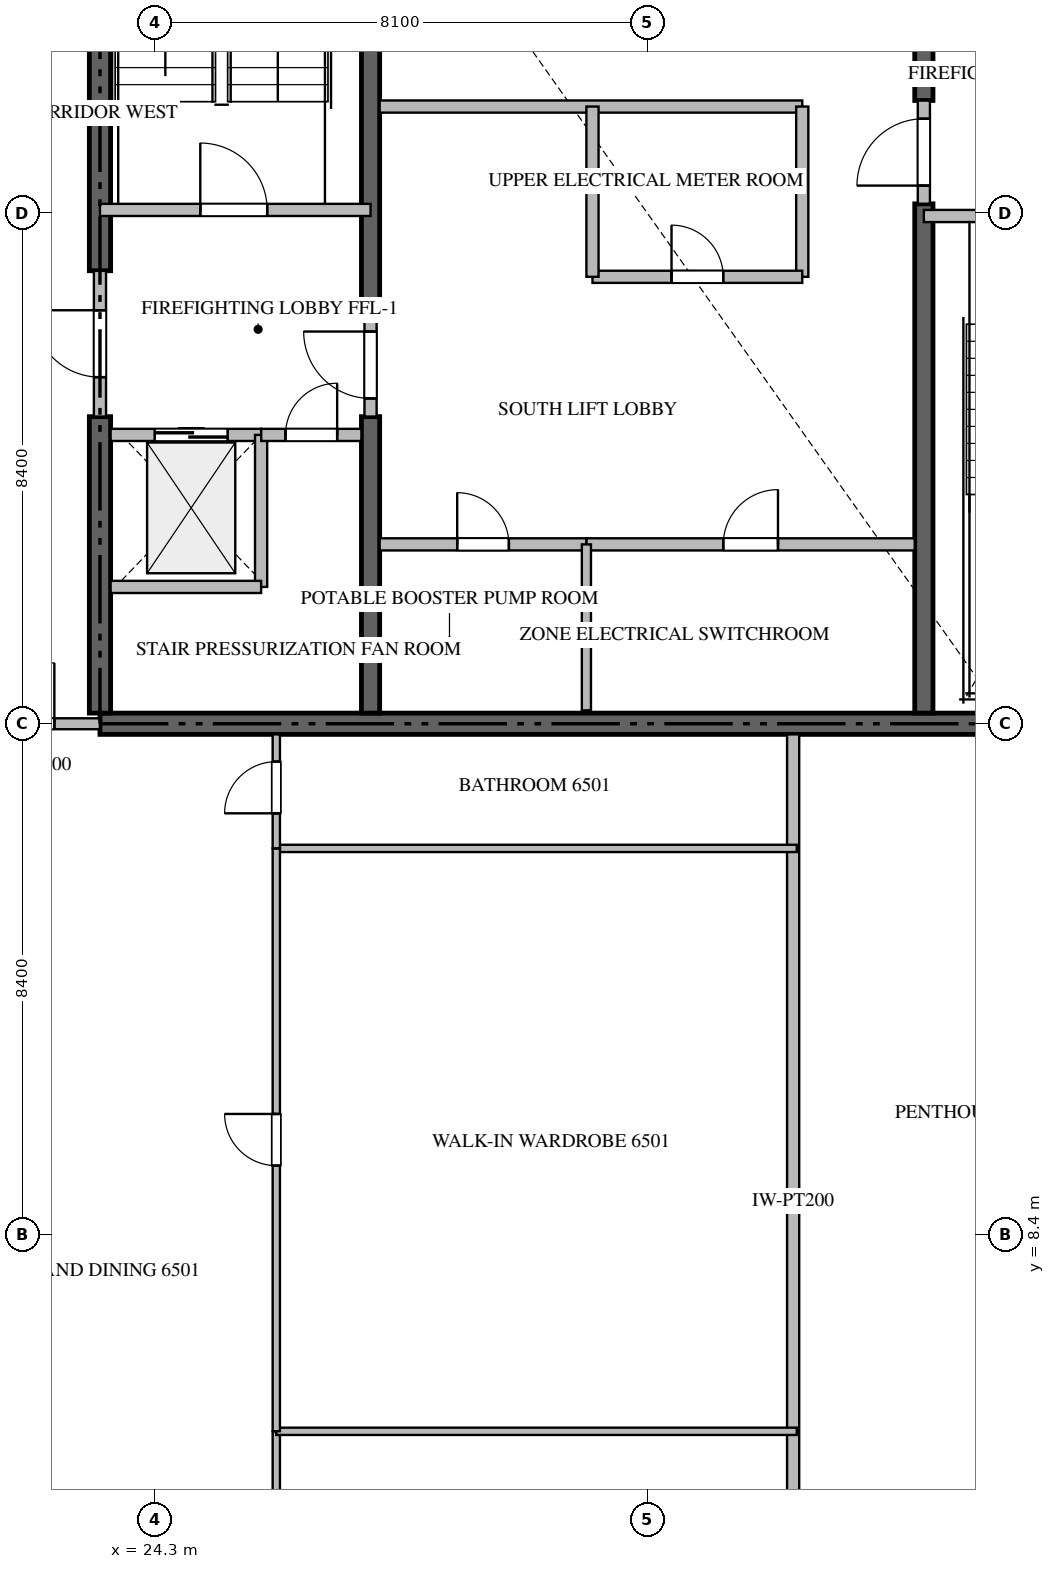
"""IFC4 building model, lengths in metres.
Left out: names, types, materials, properties, quantities, classifications, styles, units other than length and angle.
Written with IfcOpenShell. Run it as: python <this file> out.ifc"""

import sys

from ifc_helpers import new_model, si_unit, direction, frame, frame_2d, origin, place, context, subcontext, project, spatial, rectangle, extrude, source, transform, mapped, element, fill, save


model = new_model("IFC4")
c1 = context("Model", 3, precision=1e-05, world=origin(), true_north=direction((0.0, 1.0)))
c2 = subcontext(c1, "Body", "Model", "MODEL_VIEW")
j1 = project(units=[si_unit("LENGTHUNIT", "METRE"), si_unit("PLANEANGLEUNIT", "RADIAN")], contexts=[c1])
p1 = place(None, origin())
s1 = spatial("IfcSite", under=j1, at=p1, CompositionType="ELEMENT")
p2 = place(p1, origin())
s2 = spatial("IfcBuilding", under=s1, at=p2, CompositionType="ELEMENT")
p3 = place(p2, frame((0.0, 0.0, 260.5)))
s3 = spatial("IfcBuildingStorey", under=s2, at=p3, CompositionType="ELEMENT", Elevation=260.5)
p4 = place(p3, frame((23.4, 16.8, -0.26), z_axis=(0.0, 0.0, 1.0), x_axis=(1.0, 0.0, 0.0)))
e1 = element("IfcWall", 1, at=p4, inside=s3, PredefinedType="SHEAR", context=c2, shape_type="SweptSolid", body=[
    extrude(rectangle(XDim=18.0, YDim=0.35, at=frame_2d((9.0, 0.0))), origin(), (0.0, 0.0, 1.0), 3.848),
])
p5 = place(p3, frame((23.4, 16.975, -0.26), z_axis=(0.0, 0.0, 1.0), x_axis=(0.0, 1.0, 0.0)))
e2 = element("IfcWall", 2, at=p5, inside=s3, PredefinedType="SHEAR", context=c2, shape_type="SweptSolid", body=[
    extrude(rectangle(XDim=4.875, YDim=0.35, at=frame_2d((2.438, 0.0))), origin(), (0.0, 0.0, 1.0), 3.848),
])
p6 = place(p3, frame((23.4, 24.25, -0.26), z_axis=(0.0, 0.0, 1.0), x_axis=(0.0, 1.0, 0.0)))
e3 = element("IfcWall", 3, at=p6, inside=s3, PredefinedType="SHEAR", context=c2, shape_type="SweptSolid", body=[
    extrude(rectangle(XDim=9.175, YDim=0.35, at=frame_2d((4.587, 0.0))), origin(), (0.0, 0.0, 1.0), 3.848),
])
p7 = place(p3, frame((27.85, 16.975, -0.26), z_axis=(0.0, 0.0, 1.0), x_axis=(0.0, 1.0, 0.0)))
e4 = element("IfcWall", 4, at=p7, inside=s3, PredefinedType="SHEAR", context=c2, shape_type="SweptSolid", body=[
    extrude(rectangle(XDim=4.875, YDim=0.3, at=frame_2d((2.438, 0.0))), origin(), (0.0, 0.0, 1.0), 3.848),
])
p8 = place(p3, frame((27.85, 23.55, -0.26), z_axis=(0.0, 0.0, 1.0), x_axis=(0.0, 1.0, 0.0)))
e5 = element("IfcWall", 5, at=p8, inside=s3, PredefinedType="SHEAR", context=c2, shape_type="SweptSolid", body=[
    extrude(rectangle(XDim=9.875, YDim=0.3, at=frame_2d((4.938, 0.0))), origin(), (0.0, 0.0, 1.0), 3.848),
])
p9 = place(p3, frame((36.95, 16.975, -0.26), z_axis=(0.0, 0.0, 1.0), x_axis=(0.0, 1.0, 0.0)))
e6 = element("IfcWall", 6, at=p9, inside=s3, PredefinedType="SHEAR", context=c2, shape_type="SweptSolid", body=[
    extrude(rectangle(XDim=8.375, YDim=0.3, at=frame_2d((4.188, 0.0))), origin(), (0.0, 0.0, 1.0), 3.848),
])
p10 = place(p3, frame((36.95, 27.05, -0.26), z_axis=(0.0, 0.0, 1.0), x_axis=(0.0, 1.0, 0.0)))
e7 = element("IfcWall", 7, at=p10, inside=s3, PredefinedType="SHEAR", context=c2, shape_type="SweptSolid", body=[
    extrude(rectangle(XDim=6.375, YDim=0.3, at=frame_2d((3.188, 0.0))), origin(), (0.0, 0.0, 1.0), 3.848),
])
p11 = place(p3, frame((23.4, 25.25, 0.0), z_axis=(0.0, 0.0, 1.0), x_axis=(1.0, 0.0, 0.0)))
e8 = element("IfcWall", 8, at=p11, inside=s3, PredefinedType="STANDARD", context=c2, shape_type="SweptSolid", body=[
    extrude(rectangle(XDim=4.45, YDim=0.2, at=frame_2d((2.225, 0.0))), origin(), (0.0, 0.0, 1.0), 3.59),
])
p12 = place(p11, frame((1.65, 0.0, 0.0)))
e9 = element("IfcOpeningElement", 9, at=p12, cuts=e8, PredefinedType="OPENING", context=c2, shape_type="SweptSolid", body=[
    extrude(rectangle(XDim=1.1, YDim=2.15, at=frame_2d((0.55, 1.075))), frame((0.0, 0.11, 0.0), z_axis=(0.0, -1.0, 0.0), x_axis=(1.0, 0.0, 0.0)), (0.0, 0.0, 1.0), 0.22),
])
p13 = place(p3, frame((36.95, 25.15, 0.0), z_axis=(0.0, 0.0, 1.0), x_axis=(1.0, 0.0, 0.0)))
e10 = element("IfcWall", 10, at=p13, inside=s3, PredefinedType="STANDARD", context=c2, shape_type="SweptSolid", body=[
    extrude(rectangle(XDim=4.45, YDim=0.2, at=frame_2d((2.225, 0.0))), origin(), (0.0, 0.0, 1.0), 3.59),
])
p14 = place(p13, frame((1.65, 0.0, 0.0)))
e11 = element("IfcOpeningElement", 11, at=p14, cuts=e10, PredefinedType="OPENING", context=c2, shape_type="SweptSolid", body=[
    extrude(rectangle(XDim=1.1, YDim=2.15, at=frame_2d((0.55, 1.075))), frame((0.0, 0.11, 0.0), z_axis=(0.0, -1.0, 0.0), x_axis=(1.0, 0.0, 0.0)), (0.0, 0.0, 1.0), 0.22),
])
p15 = place(p3, frame((23.575, 21.55, 0.0), z_axis=(0.0, 0.0, 1.0), x_axis=(1.0, 0.0, 0.0)))
e12 = element("IfcWall", 12, at=p15, inside=s3, PredefinedType="STANDARD", context=c2, shape_type="SweptSolid", body=[
    extrude(rectangle(XDim=2.475, YDim=0.2, at=frame_2d((1.238, 0.0))), origin(), (0.0, 0.0, 1.0), 3.59),
])
p16 = place(p15, frame((0.725, 0.0, 0.0)))
e13 = element("IfcOpeningElement", 13, at=p16, cuts=e12, PredefinedType="OPENING", context=c2, shape_type="SweptSolid", body=[
    extrude(rectangle(XDim=1.2, YDim=2.2, at=frame_2d((0.6, 1.1))), frame((0.0, 0.11, 0.0), z_axis=(0.0, -1.0, 0.0), x_axis=(1.0, 0.0, 0.0)), (0.0, 0.0, 1.0), 0.22),
])
p17 = place(p3, frame((26.05, 19.05, 0.0), z_axis=(0.0, 0.0, 1.0), x_axis=(0.0, 1.0, 0.0)))
e14 = element("IfcWall", 14, at=p17, inside=s3, PredefinedType="STANDARD", context=c2, shape_type="SweptSolid", body=[
    extrude(rectangle(XDim=2.5, YDim=0.2, at=frame_2d((1.25, 0.0))), origin(), (0.0, 0.0, 1.0), 3.59),
])
p18 = place(p3, frame((23.575, 19.05, 0.0), z_axis=(0.0, 0.0, 1.0), x_axis=(1.0, 0.0, 0.0)))
e15 = element("IfcWall", 15, at=p18, inside=s3, PredefinedType="STANDARD", context=c2, shape_type="SweptSolid", body=[
    extrude(rectangle(XDim=2.475, YDim=0.2, at=frame_2d((1.238, 0.0))), origin(), (0.0, 0.0, 1.0), 3.59),
])
p19 = place(p3, frame((26.052, 21.55, 0.0), z_axis=(0.0, 0.0, 1.0), x_axis=(1.0, 0.0, 0.0)))
e16 = element("IfcWall", 16, at=p19, inside=s3, PredefinedType="STANDARD", context=c2, shape_type="SweptSolid", body=[
    extrude(rectangle(XDim=1.648, YDim=0.2, at=frame_2d((0.824, 0.0))), origin(), (0.0, 0.0, 1.0), 3.59),
])
p20 = place(p19, frame((0.399, 0.0, 0.0)))
e17 = element("IfcOpeningElement", 17, at=p20, cuts=e16, PredefinedType="OPENING", context=c2, shape_type="SweptSolid", body=[
    extrude(rectangle(XDim=0.85, YDim=2.1, at=frame_2d((0.425, 1.05))), frame((0.0, 0.11, 0.0), z_axis=(0.0, -1.0, 0.0), x_axis=(1.0, 0.0, 0.0)), (0.0, 0.0, 1.0), 0.22),
])
p21 = place(p3, frame((23.4, 21.852, 0.0), z_axis=(0.0, 0.0, 1.0), x_axis=(0.0, 1.0, 0.0)))
e18 = element("IfcWall", 18, at=p21, inside=s3, PredefinedType="STANDARD", context=c2, shape_type="SweptSolid", body=[
    extrude(rectangle(XDim=2.396, YDim=0.2, at=frame_2d((1.198, 0.0))), origin(), (0.0, 0.0, 1.0), 3.59),
])
p22 = place(p21, frame((0.648, 0.0, 0.0)))
e19 = element("IfcOpeningElement", 19, at=p22, cuts=e18, PredefinedType="OPENING", context=c2, shape_type="SweptSolid", body=[
    extrude(rectangle(XDim=1.1, YDim=2.15, at=frame_2d((0.55, 1.075))), frame((0.0, 0.11, 0.0), z_axis=(0.0, -1.0, 0.0), x_axis=(1.0, 0.0, 0.0)), (0.0, 0.0, 1.0), 0.22),
])
p23 = place(p3, frame((27.85, 21.852, 0.0), z_axis=(0.0, 0.0, 1.0), x_axis=(0.0, 1.0, 0.0)))
e20 = element("IfcWall", 20, at=p23, inside=s3, PredefinedType="STANDARD", context=c2, shape_type="SweptSolid", body=[
    extrude(rectangle(XDim=1.696, YDim=0.2, at=frame_2d((0.848, 0.0))), origin(), (0.0, 0.0, 1.0), 3.59),
])
p24 = place(p23, frame((0.298, 0.0, 0.0)))
e21 = element("IfcOpeningElement", 21, at=p24, cuts=e20, PredefinedType="OPENING", context=c2, shape_type="SweptSolid", body=[
    extrude(rectangle(XDim=1.1, YDim=2.15, at=frame_2d((0.55, 1.075))), frame((0.0, 0.11, 0.0), z_axis=(0.0, -1.0, 0.0), x_axis=(1.0, 0.0, 0.0)), (0.0, 0.0, 1.0), 0.22),
])
p25 = place(p3, frame((36.95, 25.352, 0.0), z_axis=(0.0, 0.0, 1.0), x_axis=(0.0, 1.0, 0.0)))
e22 = element("IfcWall", 22, at=p25, inside=s3, PredefinedType="STANDARD", context=c2, shape_type="SweptSolid", body=[
    extrude(rectangle(XDim=1.696, YDim=0.2, at=frame_2d((0.848, 0.0))), origin(), (0.0, 0.0, 1.0), 3.59),
])
p26 = place(p25, frame((0.298, 0.0, 0.0)))
e23 = element("IfcOpeningElement", 23, at=p26, cuts=e22, PredefinedType="OPENING", context=c2, shape_type="SweptSolid", body=[
    extrude(rectangle(XDim=1.1, YDim=2.15, at=frame_2d((0.55, 1.075))), frame((0.0, 0.11, 0.0), z_axis=(0.0, -1.0, 0.0), x_axis=(1.0, 0.0, 0.0)), (0.0, 0.0, 1.0), 0.22),
])
p27 = place(p3, frame((28.0, 19.75, 0.0), z_axis=(0.0, 0.0, 1.0), x_axis=(1.0, 0.0, 0.0)))
e24 = element("IfcWall", 24, at=p27, inside=s3, PredefinedType="STANDARD", context=c2, shape_type="SweptSolid", body=[
    extrude(rectangle(XDim=3.4, YDim=0.2, at=frame_2d((1.7, 0.0))), origin(), (0.0, 0.0, 1.0), 3.59),
])
p28 = place(p27, frame((1.275, 0.0, 0.0)))
e25 = element("IfcOpeningElement", 25, at=p28, cuts=e24, PredefinedType="OPENING", context=c2, shape_type="SweptSolid", body=[
    extrude(rectangle(XDim=0.85, YDim=2.1, at=frame_2d((0.425, 1.05))), frame((0.0, 0.11, 0.0), z_axis=(0.0, -1.0, 0.0), x_axis=(1.0, 0.0, 0.0)), (0.0, 0.0, 1.0), 0.22),
])
p29 = place(p3, frame((31.402, 19.75, 0.0), z_axis=(0.0, 0.0, 1.0), x_axis=(1.0, 0.0, 0.0)))
e26 = element("IfcWall", 26, at=p29, inside=s3, PredefinedType="STANDARD", context=c2, shape_type="SweptSolid", body=[
    extrude(rectangle(XDim=5.398, YDim=0.2, at=frame_2d((2.699, 0.0))), origin(), (0.0, 0.0, 1.0), 3.59),
])
p30 = place(p29, frame((2.249, 0.0, 0.0)))
e27 = element("IfcOpeningElement", 27, at=p30, cuts=e26, PredefinedType="OPENING", context=c2, shape_type="SweptSolid", body=[
    extrude(rectangle(XDim=0.9, YDim=2.1, at=frame_2d((0.45, 1.05))), frame((0.0, 0.11, 0.0), z_axis=(0.0, -1.0, 0.0), x_axis=(1.0, 0.0, 0.0)), (0.0, 0.0, 1.0), 0.22),
])
p31 = place(p3, frame((31.4, 17.02, 0.0), z_axis=(0.0, 0.0, 1.0), x_axis=(0.0, 1.0, 0.0)))
e28 = element("IfcWall", 28, at=p31, inside=s3, PredefinedType="PARTITIONING", context=c2, shape_type="SweptSolid", body=[
    extrude(rectangle(XDim=2.73, YDim=0.15, at=frame_2d((1.365, 0.0))), origin(), (0.0, 0.0, 1.0), 3.59),
])
p32 = place(p3, frame((28.0, 26.95, 0.0), z_axis=(0.0, 0.0, 1.0), x_axis=(1.0, 0.0, 0.0)))
e29 = element("IfcWall", 29, at=p32, inside=s3, PredefinedType="STANDARD", context=c2, shape_type="SweptSolid", body=[
    extrude(rectangle(XDim=6.95, YDim=0.2, at=frame_2d((3.475, 0.0))), origin(), (0.0, 0.0, 1.0), 3.59),
])
p33 = place(p3, frame((34.95, 24.15, 0.0), z_axis=(0.0, 0.0, 1.0), x_axis=(0.0, 1.0, 0.0)))
e30 = element("IfcWall", 30, at=p33, inside=s3, PredefinedType="STANDARD", context=c2, shape_type="SweptSolid", body=[
    extrude(rectangle(XDim=2.8, YDim=0.2, at=frame_2d((1.4, 0.0))), origin(), (0.0, 0.0, 1.0), 3.59),
])
p34 = place(p3, frame((31.5, 24.15, 0.0), z_axis=(0.0, 0.0, 1.0), x_axis=(1.0, 0.0, 0.0)))
e31 = element("IfcWall", 31, at=p34, inside=s3, PredefinedType="STANDARD", context=c2, shape_type="SweptSolid", body=[
    extrude(rectangle(XDim=3.45, YDim=0.2, at=frame_2d((1.725, 0.0))), origin(), (0.0, 0.0, 1.0), 3.59),
])
p35 = place(p34, frame((1.3, 0.0, 0.0)))
e32 = element("IfcOpeningElement", 32, at=p35, cuts=e31, PredefinedType="OPENING", context=c2, shape_type="SweptSolid", body=[
    extrude(rectangle(XDim=0.85, YDim=2.1, at=frame_2d((0.425, 1.05))), frame((0.0, 0.11, 0.0), z_axis=(0.0, -1.0, 0.0), x_axis=(1.0, 0.0, 0.0)), (0.0, 0.0, 1.0), 0.22),
])
p36 = place(p3, frame((31.5, 24.15, 0.0), z_axis=(0.0, 0.0, 1.0), x_axis=(0.0, 1.0, 0.0)))
e33 = element("IfcWall", 33, at=p36, inside=s3, PredefinedType="STANDARD", context=c2, shape_type="SweptSolid", body=[
    extrude(rectangle(XDim=2.8, YDim=0.2, at=frame_2d((1.4, 0.0))), origin(), (0.0, 0.0, 1.0), 3.59),
])
p37 = place(p3, frame((34.8, 1.282, 0.0), z_axis=(0.0, 0.0, 1.0), x_axis=(0.0, 1.0, 0.0)))
e34 = element("IfcWall", 34, at=p37, inside=s3, PredefinedType="PARTITIONING", context=c2, shape_type="SweptSolid", body=[
    extrude(rectangle(XDim=15.343, YDim=0.2, at=frame_2d((7.671, 0.0))), origin(), (0.0, 0.0, 1.0), 3.59),
])
p38 = place(p3, frame((20.902, 16.8, 0.0), z_axis=(0.0, 0.0, 1.0), x_axis=(1.0, 0.0, 0.0)))
e35 = element("IfcWall", 35, at=p38, inside=s3, PredefinedType="PARTITIONING", context=c2, shape_type="SweptSolid", body=[
    extrude(rectangle(XDim=2.496, YDim=0.18, at=frame_2d((1.248, 0.0))), origin(), (0.0, 0.0, 1.0), 3.59),
])
p39 = place(p38, frame((0.748, 0.0, 0.0)))
e36 = element("IfcOpeningElement", 36, at=p39, cuts=e35, PredefinedType="OPENING", context=c2, shape_type="SweptSolid", body=[
    extrude(rectangle(XDim=1.0, YDim=2.15, at=frame_2d((0.5, 1.075))), frame((0.0, 0.1, 0.0), z_axis=(0.0, -1.0, 0.0), x_axis=(1.0, 0.0, 0.0)), (0.0, 0.0, 1.0), 0.2),
])
p40 = place(p3, frame((26.3, 1.295, 0.0), z_axis=(0.0, 0.0, 1.0), x_axis=(0.0, 1.0, 0.0)))
e37 = element("IfcWall", 37, at=p40, inside=s3, PredefinedType="PARTITIONING", context=c2, shape_type="SweptSolid", body=[
    extrude(rectangle(XDim=3.869, YDim=0.12, at=frame_2d((1.935, 0.0))), origin(), (0.0, 0.0, 1.0), 3.59),
])
p41 = place(p40, frame((1.633, 0.0, 0.0)))
e38 = element("IfcOpeningElement", 38, at=p41, cuts=e37, PredefinedType="OPENING", context=c2, shape_type="SweptSolid", body=[
    extrude(rectangle(XDim=0.9, YDim=2.1, at=frame_2d((0.45, 1.05))), frame((0.0, 0.07, 0.0), z_axis=(0.0, -1.0, 0.0), x_axis=(1.0, 0.0, 0.0)), (0.0, 0.0, 1.0), 0.14),
])
for number, where, z_axis, x_axis in (
    (39, (26.3, 5.164, 0.0), (0.0, 0.0, 1.0), (1.0, 0.0, 0.0)),
    (40, (26.3, 14.75, 0.0), (0.0, 0.0, 1.0), (1.0, 0.0, 0.0)),
):
    element("IfcWall", number, at=place(p3, frame(where, z_axis=z_axis, x_axis=x_axis)), inside=s3, PredefinedType="PARTITIONING", context=c2, shape_type="SweptSolid", body=[
        extrude(rectangle(XDim=8.56, YDim=0.12, at=frame_2d((4.28, 0.0))), origin(), (0.0, 0.0, 1.0), 3.59),
    ])
p42 = place(p3, frame((26.3, 5.166, 0.0), z_axis=(0.0, 0.0, 1.0), x_axis=(0.0, 1.0, 0.0)))
e41 = element("IfcWall", 41, at=p42, inside=s3, PredefinedType="PARTITIONING", context=c2, shape_type="SweptSolid", body=[
    extrude(rectangle(XDim=9.584, YDim=0.12, at=frame_2d((4.792, 0.0))), origin(), (0.0, 0.0, 1.0), 3.59),
])
p43 = place(p42, frame((4.367, 0.0, 0.0)))
e42 = element("IfcOpeningElement", 42, at=p43, cuts=e41, PredefinedType="OPENING", context=c2, shape_type="SweptSolid", body=[
    extrude(rectangle(XDim=0.85, YDim=2.1, at=frame_2d((0.425, 1.05))), frame((0.0, 0.07, 0.0), z_axis=(0.0, -1.0, 0.0), x_axis=(1.0, 0.0, 0.0)), (0.0, 0.0, 1.0), 0.14),
])
p44 = place(p3, frame((26.3, 14.752, 0.0), z_axis=(0.0, 0.0, 1.0), x_axis=(0.0, 1.0, 0.0)))
e43 = element("IfcWall", 43, at=p44, inside=s3, PredefinedType="PARTITIONING", context=c2, shape_type="SweptSolid", body=[
    extrude(rectangle(XDim=1.873, YDim=0.12, at=frame_2d((0.937, 0.0))), origin(), (0.0, 0.0, 1.0), 3.59),
])
p45 = place(p44, frame((0.575, 0.0, 0.0)))
e44 = element("IfcOpeningElement", 44, at=p45, cuts=e43, PredefinedType="OPENING", context=c2, shape_type="SweptSolid", body=[
    extrude(rectangle(XDim=0.85, YDim=2.1, at=frame_2d((0.425, 1.05))), frame((0.0, 0.07, 0.0), z_axis=(0.0, -1.0, 0.0), x_axis=(1.0, 0.0, 0.0)), (0.0, 0.0, 1.0), 0.14),
])
m1 = source(origin(), c2, "Body", "SweptSolid", [
    extrude(rectangle(XDim=1.1, YDim=2.15, at=frame_2d((0.55, 1.075))), frame((0.0, 0.025, 0.0), z_axis=(0.0, -1.0, 0.0), x_axis=(1.0, 0.0, 0.0)), (0.0, 0.0, 1.0), 0.05),
])
p46 = place(p12, origin())
e45 = element("IfcDoor", 45, at=p46, inside=s3, OperationType="SINGLE_SWING_LEFT", PredefinedType="DOOR", context=c2, shape_type="MappedRepresentation", body=[
    mapped(m1, transform((0.0, 0.0, 0.0), scale=1.0)),
])
fill(e9, e45)
m2 = source(origin(), c2, "Body", "SweptSolid", [
    extrude(rectangle(XDim=1.2, YDim=2.2, at=frame_2d((0.6, 1.1))), frame((0.0, 0.025, 0.0), z_axis=(0.0, -1.0, 0.0), x_axis=(1.0, 0.0, 0.0)), (0.0, 0.0, 1.0), 0.05),
])
p47 = place(p16, origin())
e46 = element("IfcDoor", 46, at=p47, inside=s3, OperationType="DOUBLE_DOOR_SLIDING", PredefinedType="DOOR", context=c2, shape_type="MappedRepresentation", body=[
    mapped(m2, transform((0.0, 0.0, 0.0), scale=1.0)),
])
fill(e13, e46)
m3 = source(origin(), c2, "Body", "SweptSolid", [
    extrude(rectangle(XDim=0.85, YDim=2.1, at=frame_2d((0.425, 1.05))), frame((0.0, 0.025, 0.0), z_axis=(0.0, -1.0, 0.0), x_axis=(1.0, 0.0, 0.0)), (0.0, 0.0, 1.0), 0.05),
])
p48 = place(p20, origin())
e47 = element("IfcDoor", 47, at=p48, inside=s3, OperationType="SINGLE_SWING_RIGHT", PredefinedType="DOOR", context=c2, shape_type="MappedRepresentation", body=[
    mapped(m3, transform((0.0, 0.0, 0.0), scale=1.0)),
])
fill(e17, e47)
p49 = place(p22, origin())
e48 = element("IfcDoor", 48, at=p49, inside=s3, OperationType="SINGLE_SWING_RIGHT", PredefinedType="DOOR", context=c2, shape_type="MappedRepresentation", body=[
    mapped(m1, transform((0.0, 0.0, 0.0), scale=1.0)),
])
fill(e19, e48)
p50 = place(p24, origin())
e49 = element("IfcDoor", 49, at=p50, inside=s3, OperationType="SINGLE_SWING_RIGHT", PredefinedType="DOOR", context=c2, shape_type="MappedRepresentation", body=[
    mapped(m1, transform((0.0, 0.0, 0.0), scale=1.0)),
])
fill(e21, e49)
p51 = place(p26, origin())
e50 = element("IfcDoor", 50, at=p51, inside=s3, OperationType="SINGLE_SWING_LEFT", PredefinedType="DOOR", context=c2, shape_type="MappedRepresentation", body=[
    mapped(m1, transform((0.0, 0.0, 0.0), scale=1.0)),
])
fill(e23, e50)
p52 = place(p28, origin())
e51 = element("IfcDoor", 51, at=p52, inside=s3, OperationType="SINGLE_SWING_LEFT", PredefinedType="DOOR", context=c2, shape_type="MappedRepresentation", body=[
    mapped(m3, transform((0.0, 0.0, 0.0), scale=1.0)),
])
fill(e25, e51)
m4 = source(origin(), c2, "Body", "SweptSolid", [
    extrude(rectangle(XDim=0.9, YDim=2.1, at=frame_2d((0.45, 1.05))), frame((0.0, 0.025, 0.0), z_axis=(0.0, -1.0, 0.0), x_axis=(1.0, 0.0, 0.0)), (0.0, 0.0, 1.0), 0.05),
])
p53 = place(p30, origin())
e52 = element("IfcDoor", 52, at=p53, inside=s3, OperationType="SINGLE_SWING_RIGHT", PredefinedType="DOOR", context=c2, shape_type="MappedRepresentation", body=[
    mapped(m4, transform((0.0, 0.0, 0.0), scale=1.0)),
])
fill(e27, e52)
p54 = place(p35, origin())
e53 = element("IfcDoor", 53, at=p54, inside=s3, OperationType="SINGLE_SWING_LEFT", PredefinedType="DOOR", context=c2, shape_type="MappedRepresentation", body=[
    mapped(m3, transform((0.0, 0.0, 0.0), scale=1.0)),
])
fill(e32, e53)
m5 = source(origin(), c2, "Body", "SweptSolid", [
    extrude(rectangle(XDim=1.0, YDim=2.15, at=frame_2d((0.5, 1.075))), frame((0.0, 0.025, 0.0), z_axis=(0.0, -1.0, 0.0), x_axis=(1.0, 0.0, 0.0)), (0.0, 0.0, 1.0), 0.05),
])
p55 = place(p39, origin())
e54 = element("IfcDoor", 54, at=p55, inside=s3, OperationType="SINGLE_SWING_RIGHT", PredefinedType="DOOR", context=c2, shape_type="MappedRepresentation", body=[
    mapped(m5, transform((0.0, 0.0, 0.0), scale=1.0)),
])
fill(e36, e54)
p56 = place(p43, origin())
e55 = element("IfcDoor", 55, at=p56, inside=s3, OperationType="SINGLE_SWING_RIGHT", PredefinedType="DOOR", context=c2, shape_type="MappedRepresentation", body=[
    mapped(m3, transform((0.0, 0.0, 0.0), scale=1.0)),
])
fill(e42, e55)
p57 = place(p45, origin())
e56 = element("IfcDoor", 56, at=p57, inside=s3, OperationType="SINGLE_SWING_LEFT", PredefinedType="DOOR", context=c2, shape_type="MappedRepresentation", body=[
    mapped(m3, transform((0.0, 0.0, 0.0), scale=1.0)),
])
fill(e44, e56)
save(model, sys.argv[1])
